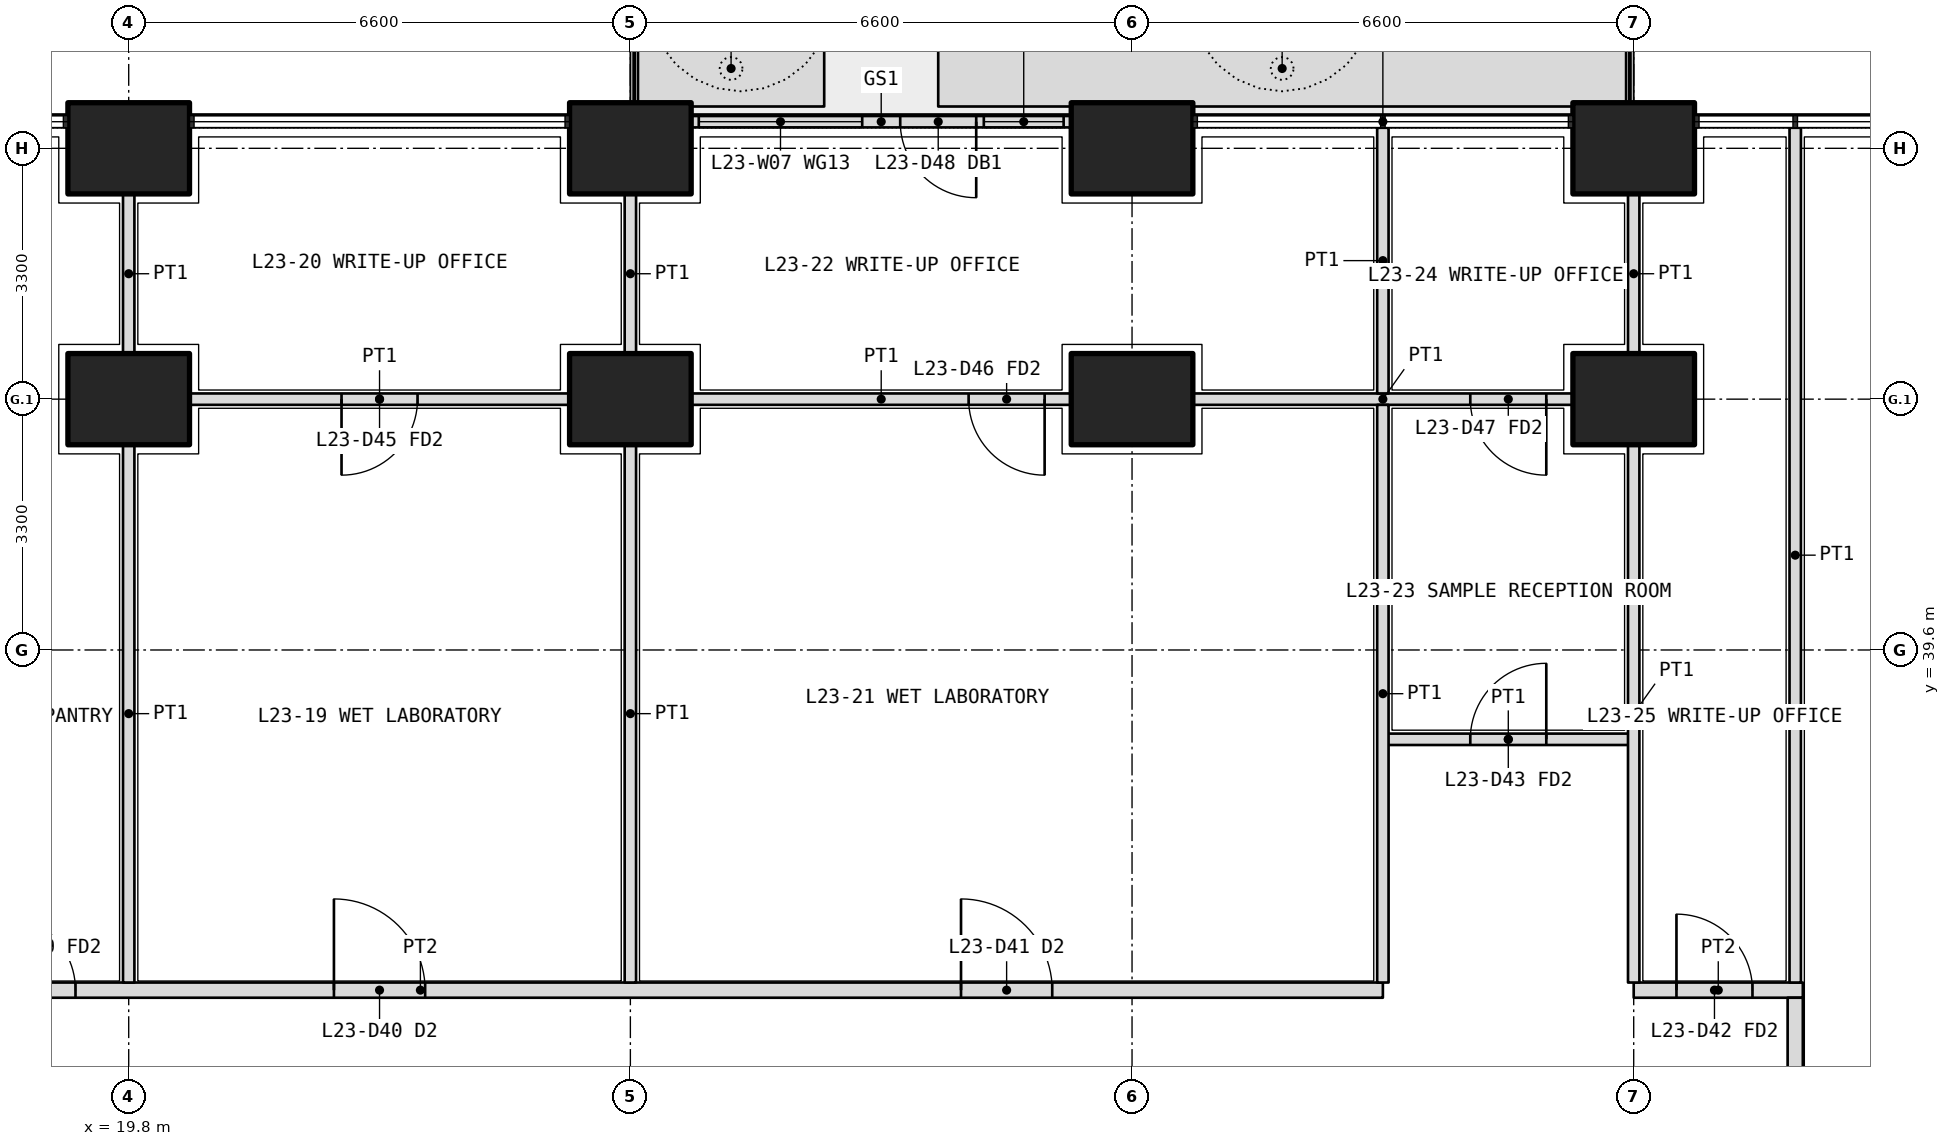
"""IFC4 building model, lengths in metres.
Left out: names, types, materials, properties, quantities, classifications, styles, units other than length and angle.
Written with IfcOpenShell. Run it as: python <this file> out.ifc"""

import sys

from ifc_helpers import new_model, si_unit, direction, frame, frame_2d, origin, origin_2d, place, context, subcontext, project, spatial, polyline, rectangle, outline, extrude, element, fill, save


model = new_model("IFC4")
c1 = context("Model", 3, precision=1e-05, world=origin(), true_north=direction((0.0, 1.0)))
c2 = subcontext(c1, "Body", "Model", "MODEL_VIEW")
j1 = project(units=[si_unit("LENGTHUNIT", "METRE"), si_unit("PLANEANGLEUNIT", "RADIAN")], contexts=[c1])
p1 = place(None, origin())
s1 = spatial("IfcSite", under=j1, at=p1, CompositionType="ELEMENT")
p2 = place(p1, origin())
s2 = spatial("IfcBuilding", under=s1, at=p2, CompositionType="ELEMENT")
p3 = place(p2, frame((0.0, 0.0, 103.2)))
s3 = spatial("IfcBuildingStorey", under=s2, at=p3, CompositionType="ELEMENT", Elevation=103.2)
for number, where, z_axis, x_axis in (
    (1, (19.8, 46.2, 0.0), (0.0, 0.0, 1.0), (1.0, 0.0, 0.0)),
    (2, (26.4, 46.2, 0.0), (0.0, 0.0, 1.0), (1.0, 0.0, 0.0)),
    (3, (33.0, 46.2, 0.0), (0.0, 0.0, 1.0), (1.0, 0.0, 0.0)),
    (4, (39.6, 46.2, 0.0), (0.0, 0.0, 1.0), (1.0, 0.0, 0.0)),
    (5, (19.8, 42.9, 0.0), (0.0, 0.0, 1.0), (1.0, 0.0, 0.0)),
    (6, (26.4, 42.9, 0.0), (0.0, 0.0, 1.0), (1.0, 0.0, 0.0)),
    (7, (33.0, 42.9, 0.0), (0.0, 0.0, 1.0), (1.0, 0.0, 0.0)),
    (8, (39.6, 42.9, 0.0), (0.0, 0.0, 1.0), (1.0, 0.0, 0.0)),
):
    element("IfcColumn", number, at=place(p3, frame(where, z_axis=z_axis, x_axis=x_axis)), inside=s3, PredefinedType="COLUMN", context=c2, shape_type="SweptSolid", body=[
        extrude(rectangle(XDim=1.6, YDim=1.2, at=origin_2d()), origin(), (0.0, 0.0, 1.0), 4.2),
    ])
p4 = place(p3, origin())
e9 = element("IfcWall", 9, at=p4, inside=s3, PredefinedType="USERDEFINED", context=c2, shape_type="SweptSolid", body=[
    extrude(outline(polyline([(26.5, 46.75), (28.95, 46.75), (28.95, 47.75), (26.5, 47.75), (26.5, 46.75)]), holes=[polyline([(26.65, 46.9), (28.8, 46.9), (28.8, 47.6), (26.65, 47.6), (26.65, 46.9)])]), origin(), (0.0, 0.0, 1.0), 1.05),
])
p5 = place(p3, origin())
e10 = element("IfcWall", 10, at=p5, inside=s3, PredefinedType="USERDEFINED", context=c2, shape_type="SweptSolid", body=[
    extrude(outline(polyline([(30.45, 46.75), (39.5, 46.75), (39.5, 47.75), (30.45, 47.75), (30.45, 46.75)]), holes=[polyline([(30.6, 46.9), (39.35, 46.9), (39.35, 47.6), (30.6, 47.6), (30.6, 46.9)])]), origin(), (0.0, 0.0, 1.0), 1.05),
])
p6 = place(p3, frame((32.2, 46.55, 0.0), z_axis=(0.0, 0.0, 1.0), x_axis=(-1.0, 0.0, 0.0)))
e11 = element("IfcWall", 11, at=p6, inside=s3, PredefinedType="SOLIDWALL", context=c2, shape_type="SweptSolid", body=[
    extrude(rectangle(XDim=5.0, YDim=0.15, at=frame_2d((2.5, 0.0))), origin(), (0.0, 0.0, 1.0), 2.7),
])
p7 = place(p6, frame((1.25, 0.0, 0.0)))
e12 = element("IfcOpeningElement", 12, at=p7, cuts=e11, PredefinedType="OPENING", context=c2, shape_type="SweptSolid", body=[
    extrude(rectangle(XDim=1.0, YDim=2.4, at=frame_2d((0.5, 1.2))), frame((0.0, 0.085, 0.0), z_axis=(0.0, -1.0, 0.0), x_axis=(1.0, 0.0, 0.0)), (0.0, 0.0, 1.0), 0.17),
])
p8 = place(p6, frame((0.1, 0.0, 0.1)))
e13 = element("IfcOpeningElement", 13, at=p8, cuts=e11, PredefinedType="OPENING", context=c2, shape_type="SweptSolid", body=[
    extrude(rectangle(XDim=1.05, YDim=2.3, at=frame_2d((0.525, 1.15))), frame((0.0, 0.085, 0.0), z_axis=(0.0, -1.0, 0.0), x_axis=(1.0, 0.0, 0.0)), (0.0, 0.0, 1.0), 0.17),
])
p9 = place(p6, frame((2.75, 0.0, 0.1)))
e14 = element("IfcOpeningElement", 14, at=p9, cuts=e11, PredefinedType="OPENING", context=c2, shape_type="SweptSolid", body=[
    extrude(rectangle(XDim=2.15, YDim=2.3, at=frame_2d((1.075, 1.15))), frame((0.0, 0.085, 0.0), z_axis=(0.0, -1.0, 0.0), x_axis=(1.0, 0.0, 0.0)), (0.0, 0.0, 1.0), 0.17),
])
p10 = place(p3, frame((10.975, 35.125, 0.0), z_axis=(0.0, 0.0, 1.0), x_axis=(1.0, 0.0, 0.0)))
e15 = element("IfcWall", 15, at=p10, inside=s3, PredefinedType="PARTITIONING", context=c2, shape_type="SweptSolid", body=[
    extrude(rectangle(XDim=25.325, YDim=0.2, at=frame_2d((12.663, 0.0))), origin(), (0.0, 0.0, 1.0), 2.85),
])
p11 = place(p10, frame((0.663, 0.0, 0.0)))
e16 = element("IfcOpeningElement", 16, at=p11, cuts=e15, PredefinedType="OPENING", context=c2, shape_type="SweptSolid", body=[
    extrude(rectangle(XDim=1.0, YDim=2.1, at=frame_2d((0.5, 1.05))), frame((0.0, 0.11, 0.0), z_axis=(0.0, -1.0, 0.0), x_axis=(1.0, 0.0, 0.0)), (0.0, 0.0, 1.0), 0.22),
])
p12 = place(p10, frame((3.825, 0.0, 0.0)))
e17 = element("IfcOpeningElement", 17, at=p12, cuts=e15, PredefinedType="OPENING", context=c2, shape_type="SweptSolid", body=[
    extrude(rectangle(XDim=1.0, YDim=2.1, at=frame_2d((0.5, 1.05))), frame((0.0, 0.11, 0.0), z_axis=(0.0, -1.0, 0.0), x_axis=(1.0, 0.0, 0.0)), (0.0, 0.0, 1.0), 0.22),
])
p13 = place(p10, frame((7.125, 0.0, 0.0)))
e18 = element("IfcOpeningElement", 18, at=p13, cuts=e15, PredefinedType="OPENING", context=c2, shape_type="SweptSolid", body=[
    extrude(rectangle(XDim=1.0, YDim=2.1, at=frame_2d((0.5, 1.05))), frame((0.0, 0.11, 0.0), z_axis=(0.0, -1.0, 0.0), x_axis=(1.0, 0.0, 0.0)), (0.0, 0.0, 1.0), 0.22),
])
p14 = place(p10, frame((11.525, 0.0, 0.0)))
e19 = element("IfcOpeningElement", 19, at=p14, cuts=e15, PredefinedType="OPENING", context=c2, shape_type="SweptSolid", body=[
    extrude(rectangle(XDim=1.2, YDim=2.1, at=frame_2d((0.6, 1.05))), frame((0.0, 0.11, 0.0), z_axis=(0.0, -1.0, 0.0), x_axis=(1.0, 0.0, 0.0)), (0.0, 0.0, 1.0), 0.22),
])
p15 = place(p10, frame((19.775, 0.0, 0.0)))
e20 = element("IfcOpeningElement", 20, at=p15, cuts=e15, PredefinedType="OPENING", context=c2, shape_type="SweptSolid", body=[
    extrude(rectangle(XDim=1.2, YDim=2.1, at=frame_2d((0.6, 1.05))), frame((0.0, 0.11, 0.0), z_axis=(0.0, -1.0, 0.0), x_axis=(1.0, 0.0, 0.0)), (0.0, 0.0, 1.0), 0.22),
])
p16 = place(p3, frame((39.6, 35.125, 0.0), z_axis=(0.0, 0.0, 1.0), x_axis=(1.0, 0.0, 0.0)))
e21 = element("IfcWall", 21, at=p16, inside=s3, PredefinedType="PARTITIONING", context=c2, shape_type="SweptSolid", body=[
    extrude(rectangle(XDim=2.225, YDim=0.2, at=frame_2d((1.112, 0.0))), origin(), (0.0, 0.0, 1.0), 2.85),
])
p17 = place(p16, frame((0.562, 0.0, 0.0)))
e22 = element("IfcOpeningElement", 22, at=p17, cuts=e21, PredefinedType="OPENING", context=c2, shape_type="SweptSolid", body=[
    extrude(rectangle(XDim=1.0, YDim=2.1, at=frame_2d((0.5, 1.05))), frame((0.0, 0.11, 0.0), z_axis=(0.0, -1.0, 0.0), x_axis=(1.0, 0.0, 0.0)), (0.0, 0.0, 1.0), 0.22),
])
p18 = place(p3, frame((41.725, 7.4, 0.0), z_axis=(0.0, 0.0, 1.0), x_axis=(0.0, 1.0, 0.0)))
e23 = element("IfcWall", 23, at=p18, inside=s3, PredefinedType="PARTITIONING", context=c2, shape_type="SweptSolid", body=[
    extrude(rectangle(XDim=27.625, YDim=0.2, at=frame_2d((13.812, 0.0))), origin(), (0.0, 0.0, 1.0), 2.85),
])
p19 = place(p18, frame((5.65, 0.0, 0.0)))
e24 = element("IfcOpeningElement", 24, at=p19, cuts=e23, PredefinedType="OPENING", context=c2, shape_type="SweptSolid", body=[
    extrude(rectangle(XDim=1.0, YDim=2.1, at=frame_2d((0.5, 1.05))), frame((0.0, 0.11, 0.0), z_axis=(0.0, -1.0, 0.0), x_axis=(1.0, 0.0, 0.0)), (0.0, 0.0, 1.0), 0.22),
])
p20 = place(p18, frame((13.5, 0.0, 0.0)))
e25 = element("IfcOpeningElement", 25, at=p20, cuts=e23, PredefinedType="OPENING", context=c2, shape_type="SweptSolid", body=[
    extrude(rectangle(XDim=1.0, YDim=2.1, at=frame_2d((0.5, 1.05))), frame((0.0, 0.11, 0.0), z_axis=(0.0, -1.0, 0.0), x_axis=(1.0, 0.0, 0.0)), (0.0, 0.0, 1.0), 0.22),
])
p21 = place(p18, frame((16.85, 0.0, 0.0)))
e26 = element("IfcOpeningElement", 26, at=p21, cuts=e23, PredefinedType="OPENING", context=c2, shape_type="SweptSolid", body=[
    extrude(rectangle(XDim=0.9, YDim=2.1, at=frame_2d((0.45, 1.05))), frame((0.0, 0.11, 0.0), z_axis=(0.0, -1.0, 0.0), x_axis=(1.0, 0.0, 0.0)), (0.0, 0.0, 1.0), 0.22),
])
p22 = place(p18, frame((20.15, 0.0, 0.0)))
e27 = element("IfcOpeningElement", 27, at=p22, cuts=e23, PredefinedType="OPENING", context=c2, shape_type="SweptSolid", body=[
    extrude(rectangle(XDim=1.0, YDim=2.1, at=frame_2d((0.5, 1.05))), frame((0.0, 0.11, 0.0), z_axis=(0.0, -1.0, 0.0), x_axis=(1.0, 0.0, 0.0)), (0.0, 0.0, 1.0), 0.22),
])
p23 = place(p18, frame((24.512, 0.0, 0.0)))
e28 = element("IfcOpeningElement", 28, at=p23, cuts=e23, PredefinedType="OPENING", context=c2, shape_type="SweptSolid", body=[
    extrude(rectangle(XDim=1.0, YDim=2.1, at=frame_2d((0.5, 1.05))), frame((0.0, 0.11, 0.0), z_axis=(0.0, -1.0, 0.0), x_axis=(1.0, 0.0, 0.0)), (0.0, 0.0, 1.0), 0.22),
])
p24 = place(p3, frame((41.725, 46.47, 0.0), z_axis=(0.0, 0.0, 1.0), x_axis=(0.0, -1.0, 0.0)))
e29 = element("IfcWall", 29, at=p24, inside=s3, PredefinedType="PARTITIONING", context=c2, shape_type="SweptSolid", body=[
    extrude(rectangle(XDim=11.245, YDim=0.15, at=frame_2d((5.623, 0.0))), origin(), (0.0, 0.0, 1.0), 2.7),
])
p25 = place(p3, frame((38.8, 42.9, 0.0), z_axis=(0.0, 0.0, 1.0), x_axis=(-1.0, 0.0, 0.0)))
e30 = element("IfcWall", 30, at=p25, inside=s3, PredefinedType="PARTITIONING", context=c2, shape_type="SweptSolid", body=[
    extrude(rectangle(XDim=5.0, YDim=0.15, at=frame_2d((2.5, 0.0))), origin(), (0.0, 0.0, 1.0), 3.9),
])
p26 = place(p25, frame((0.35, 0.0, 0.0)))
e31 = element("IfcOpeningElement", 31, at=p26, cuts=e30, PredefinedType="OPENING", context=c2, shape_type="SweptSolid", body=[
    extrude(rectangle(XDim=1.0, YDim=2.1, at=frame_2d((0.5, 1.05))), frame((0.0, 0.085, 0.0), z_axis=(0.0, -1.0, 0.0), x_axis=(1.0, 0.0, 0.0)), (0.0, 0.0, 1.0), 0.17),
])
p27 = place(p3, frame((32.2, 42.9, 0.0), z_axis=(0.0, 0.0, 1.0), x_axis=(-1.0, 0.0, 0.0)))
e32 = element("IfcWall", 32, at=p27, inside=s3, PredefinedType="PARTITIONING", context=c2, shape_type="SweptSolid", body=[
    extrude(rectangle(XDim=5.0, YDim=0.15, at=frame_2d((2.5, 0.0))), origin(), (0.0, 0.0, 1.0), 3.9),
])
p28 = place(p27, frame((0.35, 0.0, 0.0)))
e33 = element("IfcOpeningElement", 33, at=p28, cuts=e32, PredefinedType="OPENING", context=c2, shape_type="SweptSolid", body=[
    extrude(rectangle(XDim=1.0, YDim=2.1, at=frame_2d((0.5, 1.05))), frame((0.0, 0.085, 0.0), z_axis=(0.0, -1.0, 0.0), x_axis=(1.0, 0.0, 0.0)), (0.0, 0.0, 1.0), 0.17),
])
p29 = place(p3, frame((25.6, 42.9, 0.0), z_axis=(0.0, 0.0, 1.0), x_axis=(-1.0, 0.0, 0.0)))
e34 = element("IfcWall", 34, at=p29, inside=s3, PredefinedType="PARTITIONING", context=c2, shape_type="SweptSolid", body=[
    extrude(rectangle(XDim=5.0, YDim=0.15, at=frame_2d((2.5, 0.0))), origin(), (0.0, 0.0, 1.0), 3.9),
])
p30 = place(p29, frame((2.0, 0.0, 0.0)))
e35 = element("IfcOpeningElement", 35, at=p30, cuts=e34, PredefinedType="OPENING", context=c2, shape_type="SweptSolid", body=[
    extrude(rectangle(XDim=1.0, YDim=2.1, at=frame_2d((0.5, 1.05))), frame((0.0, 0.085, 0.0), z_axis=(0.0, -1.0, 0.0), x_axis=(1.0, 0.0, 0.0)), (0.0, 0.0, 1.0), 0.17),
])
p31 = place(p3, frame((19.8, 45.6, 0.0), z_axis=(0.0, 0.0, 1.0), x_axis=(0.0, -1.0, 0.0)))
e36 = element("IfcWall", 36, at=p31, inside=s3, PredefinedType="PARTITIONING", context=c2, shape_type="SweptSolid", body=[
    extrude(rectangle(XDim=2.1, YDim=0.15, at=frame_2d((1.05, 0.0))), origin(), (0.0, 0.0, 1.0), 2.85),
])
p32 = place(p3, frame((19.8, 42.3, 0.0), z_axis=(0.0, 0.0, 1.0), x_axis=(0.0, -1.0, 0.0)))
e37 = element("IfcWall", 37, at=p32, inside=s3, PredefinedType="PARTITIONING", context=c2, shape_type="SweptSolid", body=[
    extrude(rectangle(XDim=7.075, YDim=0.15, at=frame_2d((3.538, 0.0))), origin(), (0.0, 0.0, 1.0), 2.85),
])
p33 = place(p3, frame((36.3, 38.425, 0.0), z_axis=(0.0, 0.0, 1.0), x_axis=(1.0, 0.0, 0.0)))
e38 = element("IfcWall", 38, at=p33, inside=s3, PredefinedType="PARTITIONING", context=c2, shape_type="SweptSolid", body=[
    extrude(rectangle(XDim=3.3, YDim=0.15, at=frame_2d((1.65, 0.0))), origin(), (0.0, 0.0, 1.0), 2.85),
])
p34 = place(p33, frame((1.15, 0.0, 0.0)))
e39 = element("IfcOpeningElement", 39, at=p34, cuts=e38, PredefinedType="OPENING", context=c2, shape_type="SweptSolid", body=[
    extrude(rectangle(XDim=1.0, YDim=2.1, at=frame_2d((0.5, 1.05))), frame((0.0, 0.085, 0.0), z_axis=(0.0, -1.0, 0.0), x_axis=(1.0, 0.0, 0.0)), (0.0, 0.0, 1.0), 0.17),
])
p35 = place(p3, frame((26.4, 45.6, 0.0), z_axis=(0.0, 0.0, 1.0), x_axis=(0.0, -1.0, 0.0)))
e40 = element("IfcWall", 40, at=p35, inside=s3, PredefinedType="PARTITIONING", context=c2, shape_type="SweptSolid", body=[
    extrude(rectangle(XDim=2.1, YDim=0.15, at=frame_2d((1.05, 0.0))), origin(), (0.0, 0.0, 1.0), 2.85),
])
p36 = place(p3, frame((26.4, 42.3, 0.0), z_axis=(0.0, 0.0, 1.0), x_axis=(0.0, -1.0, 0.0)))
e41 = element("IfcWall", 41, at=p36, inside=s3, PredefinedType="PARTITIONING", context=c2, shape_type="SweptSolid", body=[
    extrude(rectangle(XDim=7.075, YDim=0.15, at=frame_2d((3.538, 0.0))), origin(), (0.0, 0.0, 1.0), 2.85),
])
p37 = place(p3, frame((36.3, 46.47, 0.0), z_axis=(0.0, 0.0, 1.0), x_axis=(0.0, -1.0, 0.0)))
e42 = element("IfcWall", 42, at=p37, inside=s3, PredefinedType="PARTITIONING", context=c2, shape_type="SweptSolid", body=[
    extrude(rectangle(XDim=3.495, YDim=0.15, at=frame_2d((1.748, 0.0))), origin(), (0.0, 0.0, 1.0), 2.7),
])
p38 = place(p3, frame((36.3, 42.825, 0.0), z_axis=(0.0, 0.0, 1.0), x_axis=(0.0, -1.0, 0.0)))
e43 = element("IfcWall", 43, at=p38, inside=s3, PredefinedType="PARTITIONING", context=c2, shape_type="SweptSolid", body=[
    extrude(rectangle(XDim=7.6, YDim=0.15, at=frame_2d((3.8, 0.0))), origin(), (0.0, 0.0, 1.0), 3.9),
])
p39 = place(p3, frame((39.6, 45.6, 0.0), z_axis=(0.0, 0.0, 1.0), x_axis=(0.0, -1.0, 0.0)))
e44 = element("IfcWall", 44, at=p39, inside=s3, PredefinedType="PARTITIONING", context=c2, shape_type="SweptSolid", body=[
    extrude(rectangle(XDim=2.1, YDim=0.15, at=frame_2d((1.05, 0.0))), origin(), (0.0, 0.0, 1.0), 2.85),
])
p40 = place(p3, frame((39.6, 42.3, 0.0), z_axis=(0.0, 0.0, 1.0), x_axis=(0.0, -1.0, 0.0)))
e45 = element("IfcWall", 45, at=p40, inside=s3, PredefinedType="PARTITIONING", context=c2, shape_type="SweptSolid", body=[
    extrude(rectangle(XDim=7.075, YDim=0.15, at=frame_2d((3.538, 0.0))), origin(), (0.0, 0.0, 1.0), 2.85),
])
p41 = place(p7, origin())
e46 = element("IfcDoor", 46, at=p41, inside=s3, OperationType="SINGLE_SWING_LEFT", PredefinedType="DOOR", context=c2, shape_type="SweptSolid", body=[
    extrude(rectangle(XDim=1.0, YDim=2.4, at=frame_2d((0.5, 1.2))), frame((0.0, 0.025, 0.0), z_axis=(0.0, -1.0, 0.0), x_axis=(1.0, 0.0, 0.0)), (0.0, 0.0, 1.0), 0.05),
])
fill(e12, e46)
p42 = place(p8, origin())
e47 = element("IfcWindow", 47, at=p42, inside=s3, PartitioningType="SINGLE_PANEL", PredefinedType="WINDOW", context=c2, shape_type="SweptSolid", body=[
    extrude(rectangle(XDim=1.05, YDim=2.3, at=frame_2d((0.525, 1.15))), frame((0.0, 0.03, 0.0), z_axis=(0.0, -1.0, 0.0), x_axis=(1.0, 0.0, 0.0)), (0.0, 0.0, 1.0), 0.06),
])
fill(e13, e47)
p43 = place(p9, origin())
e48 = element("IfcWindow", 48, at=p43, inside=s3, PartitioningType="SINGLE_PANEL", PredefinedType="WINDOW", context=c2, shape_type="SweptSolid", body=[
    extrude(rectangle(XDim=2.15, YDim=2.3, at=frame_2d((1.075, 1.15))), frame((0.0, 0.03, 0.0), z_axis=(0.0, -1.0, 0.0), x_axis=(1.0, 0.0, 0.0)), (0.0, 0.0, 1.0), 0.06),
])
fill(e14, e48)
p44 = place(p13, origin())
e49 = element("IfcDoor", 49, at=p44, inside=s3, OperationType="SINGLE_SWING_LEFT", PredefinedType="DOOR", context=c2, shape_type="SweptSolid", body=[
    extrude(rectangle(XDim=1.0, YDim=2.1, at=frame_2d((0.5, 1.05))), frame((0.0, 0.025, 0.0), z_axis=(0.0, -1.0, 0.0), x_axis=(1.0, 0.0, 0.0)), (0.0, 0.0, 1.0), 0.05),
])
fill(e18, e49)
p45 = place(p14, origin())
e50 = element("IfcDoor", 50, at=p45, inside=s3, OperationType="DOUBLE_DOOR_SINGLE_SWING", PredefinedType="DOOR", context=c2, shape_type="SweptSolid", body=[
    extrude(rectangle(XDim=1.2, YDim=2.1, at=frame_2d((0.6, 1.05))), frame((0.0, 0.025, 0.0), z_axis=(0.0, -1.0, 0.0), x_axis=(1.0, 0.0, 0.0)), (0.0, 0.0, 1.0), 0.05),
])
fill(e19, e50)
p46 = place(p30, origin())
e51 = element("IfcDoor", 51, at=p46, inside=s3, OperationType="SINGLE_SWING_RIGHT", PredefinedType="DOOR", context=c2, shape_type="SweptSolid", body=[
    extrude(rectangle(XDim=1.0, YDim=2.1, at=frame_2d((0.5, 1.05))), frame((0.0, 0.025, 0.0), z_axis=(0.0, -1.0, 0.0), x_axis=(1.0, 0.0, 0.0)), (0.0, 0.0, 1.0), 0.05),
])
fill(e35, e51)
p47 = place(p15, origin())
e52 = element("IfcDoor", 52, at=p47, inside=s3, OperationType="DOUBLE_DOOR_SINGLE_SWING", PredefinedType="DOOR", context=c2, shape_type="SweptSolid", body=[
    extrude(rectangle(XDim=1.2, YDim=2.1, at=frame_2d((0.6, 1.05))), frame((0.0, 0.025, 0.0), z_axis=(0.0, -1.0, 0.0), x_axis=(1.0, 0.0, 0.0)), (0.0, 0.0, 1.0), 0.05),
])
fill(e20, e52)
p48 = place(p28, origin())
e53 = element("IfcDoor", 53, at=p48, inside=s3, OperationType="SINGLE_SWING_LEFT", PredefinedType="DOOR", context=c2, shape_type="SweptSolid", body=[
    extrude(rectangle(XDim=1.0, YDim=2.1, at=frame_2d((0.5, 1.05))), frame((0.0, 0.025, 0.0), z_axis=(0.0, -1.0, 0.0), x_axis=(1.0, 0.0, 0.0)), (0.0, 0.0, 1.0), 0.05),
])
fill(e33, e53)
p49 = place(p34, origin())
e54 = element("IfcDoor", 54, at=p49, inside=s3, OperationType="SINGLE_SWING_RIGHT", PredefinedType="DOOR", context=c2, shape_type="SweptSolid", body=[
    extrude(rectangle(XDim=1.0, YDim=2.1, at=frame_2d((0.5, 1.05))), frame((0.0, 0.025, 0.0), z_axis=(0.0, -1.0, 0.0), x_axis=(1.0, 0.0, 0.0)), (0.0, 0.0, 1.0), 0.05),
])
fill(e39, e54)
p50 = place(p26, origin())
e55 = element("IfcDoor", 55, at=p50, inside=s3, OperationType="SINGLE_SWING_LEFT", PredefinedType="DOOR", context=c2, shape_type="SweptSolid", body=[
    extrude(rectangle(XDim=1.0, YDim=2.1, at=frame_2d((0.5, 1.05))), frame((0.0, 0.025, 0.0), z_axis=(0.0, -1.0, 0.0), x_axis=(1.0, 0.0, 0.0)), (0.0, 0.0, 1.0), 0.05),
])
fill(e31, e55)
p51 = place(p17, origin())
e56 = element("IfcDoor", 56, at=p51, inside=s3, OperationType="SINGLE_SWING_LEFT", PredefinedType="DOOR", context=c2, shape_type="SweptSolid", body=[
    extrude(rectangle(XDim=1.0, YDim=2.1, at=frame_2d((0.5, 1.05))), frame((0.0, 0.025, 0.0), z_axis=(0.0, -1.0, 0.0), x_axis=(1.0, 0.0, 0.0)), (0.0, 0.0, 1.0), 0.05),
])
fill(e22, e56)
save(model, sys.argv[1])
